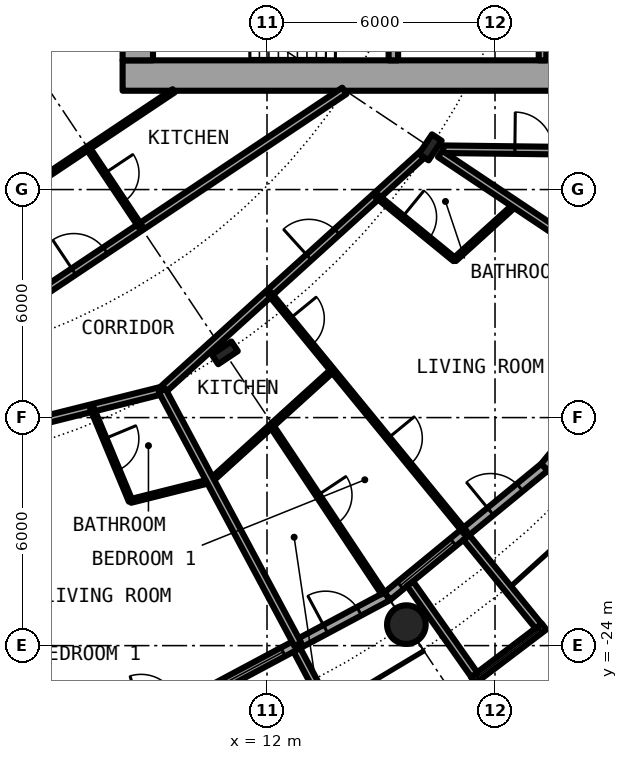
"""IFC4 building model, lengths in metres.
Left out: names, types, materials, properties, quantities, classifications, styles, units other than length and angle.
Written with IfcOpenShell. Run it as: python <this file> out.ifc"""

import sys

from ifc_helpers import new_model, si_unit, direction, frame, frame_2d, origin, origin_2d, place, context, subcontext, project, spatial, rectangle, circle, hollow_circle, i_section, extrude, element, fill, save


model = new_model("IFC4")
c1 = context("Model", 3, precision=1e-05, world=origin(), true_north=direction((0.0, 1.0)))
c2 = subcontext(c1, "Body", "Model", "MODEL_VIEW")
j1 = project(units=[si_unit("LENGTHUNIT", "METRE"), si_unit("PLANEANGLEUNIT", "RADIAN")], contexts=[c1])
p1 = place(None, origin())
s1 = spatial("IfcSite", under=j1, at=p1, CompositionType="ELEMENT")
p2 = place(p1, origin())
s2 = spatial("IfcBuilding", under=s1, at=p2, CompositionType="ELEMENT")
p3 = place(p2, frame((0.0, 0.0, 28.9)))
s3 = spatial("IfcBuildingStorey", under=s2, at=p3, CompositionType="ELEMENT", Elevation=28.9)
p4 = place(p3, frame((15.667, -23.448, 0.0), z_axis=(0.0, 0.0, 1.0), x_axis=(1.0, 0.0, 0.0)))
e1 = element("IfcColumn", 1, at=p4, inside=s3, PredefinedType="COLUMN", context=c2, shape_type="SweptSolid", body=[
    extrude(hollow_circle(Radius=0.508, WallThickness=0.05, at=origin_2d()), origin(), (0.0, 0.0, 1.0), 3.05),
])
for number, where, z_axis, x_axis in (
    (2, (10.889, -16.297, 0.0), (0.0, 0.0, 1.0), (0.556, -0.831, 0.0)),
    (3, (16.297, -10.889, 0.0), (0.0, 0.0, 1.0), (0.831, -0.556, 0.0)),
):
    element("IfcColumn", number, at=place(p3, frame(where, z_axis=z_axis, x_axis=x_axis)), inside=s3, PredefinedType="COLUMN", context=c2, shape_type="SweptSolid", body=[
        extrude(i_section(OverallWidth=0.305, OverallDepth=0.62, WebThickness=0.021, FlangeThickness=0.04, FilletRadius=0.027, at=origin_2d()), origin(), (0.0, 0.0, 1.0), 3.05),
    ])
p5 = place(p3, frame((10.447, -25.222, 0.0), z_axis=(0.0, 0.0, 1.0), x_axis=(0.881915646801, 0.471407246368, 0.0)))
e4 = element("IfcWall", 4, at=p5, inside=s3, PredefinedType="SOLIDWALL", context=c2, shape_type="SweptSolid", body=[
    extrude(rectangle(XDim=5.352, YDim=0.25, at=frame_2d((2.676, 0.0))), origin(), (0.0, 0.0, 1.0), 2.7),
])
p6 = place(p5, frame((0.441, 0.0, 0.3)))
e5 = element("IfcOpeningElement", 5, at=p6, cuts=e4, PredefinedType="OPENING", context=c2, shape_type="SweptSolid", body=[
    extrude(rectangle(XDim=1.8, YDim=2.1, at=frame_2d((0.9, 1.05))), frame((0.0, 0.135, 0.0), z_axis=(0.0, -1.0, 0.0), x_axis=(1.0, 0.0, 0.0)), (0.0, 0.0, 1.0), 0.27),
])
p7 = place(p5, frame((3.51, 0.0, 0.0)))
e6 = element("IfcOpeningElement", 6, at=p7, cuts=e4, PredefinedType="OPENING", context=c2, shape_type="SweptSolid", body=[
    extrude(rectangle(XDim=1.0, YDim=2.2, at=frame_2d((0.5, 1.1))), frame((0.0, 0.135, 0.0), z_axis=(0.0, -1.0, 0.0), x_axis=(1.0, 0.0, 0.0)), (0.0, 0.0, 1.0), 0.27),
])
p8 = place(p3, frame((12.787, -24.113, -0.03), z_axis=(0.0, 0.0, 1.0), x_axis=(0.468365282436, -0.883534924159, 0.0)))
e7 = element("IfcWall", 7, at=p8, inside=s3, PredefinedType="SOLIDWALL", context=c2, shape_type="SweptSolid", body=[
    extrude(rectangle(XDim=3.006, YDim=0.2, at=frame_2d((1.503, 0.0))), origin(), (0.0, 0.0, 1.0), 2.73),
])
p9 = place(p3, frame((15.167, -22.699, 0.0), z_axis=(0.0, 0.0, 1.0), x_axis=(0.773019449054, 0.634382322723, 0.0)))
e8 = element("IfcWall", 8, at=p9, inside=s3, PredefinedType="SOLIDWALL", context=c2, shape_type="SweptSolid", body=[
    extrude(rectangle(XDim=5.352, YDim=0.25, at=frame_2d((2.676, 0.0))), origin(), (0.0, 0.0, 1.0), 2.7),
])
p10 = place(p9, frame((0.441, 0.0, 0.3)))
e9 = element("IfcOpeningElement", 9, at=p10, cuts=e8, PredefinedType="OPENING", context=c2, shape_type="SweptSolid", body=[
    extrude(rectangle(XDim=1.8, YDim=2.1, at=frame_2d((0.9, 1.05))), frame((0.0, 0.135, 0.0), z_axis=(0.0, -1.0, 0.0), x_axis=(1.0, 0.0, 0.0)), (0.0, 0.0, 1.0), 0.27),
])
p11 = place(p9, frame((3.51, 0.0, 0.0)))
e10 = element("IfcOpeningElement", 10, at=p11, cuts=e8, PredefinedType="OPENING", context=c2, shape_type="SweptSolid", body=[
    extrude(rectangle(XDim=1.0, YDim=2.2, at=frame_2d((0.5, 1.1))), frame((0.0, 0.135, 0.0), z_axis=(0.0, -1.0, 0.0), x_axis=(1.0, 0.0, 0.0)), (0.0, 0.0, 1.0), 0.27),
])
p12 = place(p3, frame((17.427, -24.909, -0.03), z_axis=(0.0, 0.0, 1.0), x_axis=(0.796842165306, 0.60418752353, 0.0)))
e11 = element("IfcWall", 11, at=p12, inside=s3, PredefinedType="SOLIDWALL", context=c2, shape_type="SweptSolid", body=[
    extrude(rectangle(XDim=2.337, YDim=0.2, at=frame_2d((1.168, 0.0))), origin(), (0.0, 0.0, 1.0), 2.73),
])
p13 = place(p12, frame((0.128, 0.0, 0.33)))
e12 = element("IfcOpeningElement", 12, at=p13, cuts=e11, PredefinedType="OPENING", context=c2, shape_type="SweptSolid", body=[
    extrude(circle(Radius=1.04, at=frame_2d((1.04, 1.04))), frame((0.0, 0.11, 0.0), z_axis=(0.0, -1.0, 0.0), x_axis=(1.0, 0.0, 0.0)), (0.0, 0.0, 1.0), 0.22),
])
p14 = place(p3, frame((15.765, -22.37, -0.03), z_axis=(0.0, 0.0, 1.0), x_axis=(0.576274612209, -0.817256123454, 0.0)))
e13 = element("IfcWall", 13, at=p14, inside=s3, PredefinedType="SOLIDWALL", context=c2, shape_type="SweptSolid", body=[
    extrude(rectangle(XDim=2.933, YDim=0.2, at=frame_2d((1.466, 0.0))), origin(), (0.0, 0.0, 1.0), 2.73),
])
p15 = place(p3, frame((17.246, -21.155, -0.03), z_axis=(0.0, 0.0, 1.0), x_axis=(0.631741648902, -0.775179004516, 0.0)))
e14 = element("IfcWall", 14, at=p15, inside=s3, PredefinedType="SOLIDWALL", context=c2, shape_type="SweptSolid", body=[
    extrude(rectangle(XDim=3.006, YDim=0.2, at=frame_2d((1.503, 0.0))), origin(), (0.0, 0.0, 1.0), 2.73),
])
p16 = place(p3, frame((19.304, -19.304, 0.0), z_axis=(0.0, 0.0, 1.0), x_axis=(0.634382322723, 0.773019449054, 0.0)))
e15 = element("IfcWall", 15, at=p16, inside=s3, PredefinedType="SOLIDWALL", context=c2, shape_type="SweptSolid", body=[
    extrude(rectangle(XDim=5.352, YDim=0.25, at=frame_2d((2.676, 0.0))), origin(), (0.0, 0.0, 1.0), 2.7),
])
p17 = place(p16, frame((0.441, 0.0, 0.3)))
e16 = element("IfcOpeningElement", 16, at=p17, cuts=e15, PredefinedType="OPENING", context=c2, shape_type="SweptSolid", body=[
    extrude(rectangle(XDim=1.8, YDim=2.1, at=frame_2d((0.9, 1.05))), frame((0.0, 0.135, 0.0), z_axis=(0.0, -1.0, 0.0), x_axis=(1.0, 0.0, 0.0)), (0.0, 0.0, 1.0), 0.27),
])
p18 = place(p16, frame((3.51, 0.0, 0.0)))
e17 = element("IfcOpeningElement", 17, at=p18, cuts=e15, PredefinedType="OPENING", context=c2, shape_type="SweptSolid", body=[
    extrude(rectangle(XDim=1.0, YDim=2.2, at=frame_2d((0.5, 1.1))), frame((0.0, 0.135, 0.0), z_axis=(0.0, -1.0, 0.0), x_axis=(1.0, 0.0, 0.0)), (0.0, 0.0, 1.0), 0.27),
])
p19 = place(p3, frame((19.45, -19.323, -0.03), z_axis=(0.0, 0.0, 1.0), x_axis=(0.709727076896, -0.704476739375, 0.0)))
e18 = element("IfcWall", 18, at=p19, inside=s3, PredefinedType="SOLIDWALL", context=c2, shape_type="SweptSolid", body=[
    extrude(rectangle(XDim=2.883, YDim=0.2, at=frame_2d((1.441, 0.0))), origin(), (0.0, 0.0, 1.0), 2.73),
])
p20 = place(p3, frame((8.2, -9.0, 0.0), z_axis=(0.0, 0.0, 1.0), x_axis=(1.0, 0.0, 0.0)))
e19 = element("IfcWall", 19, at=p20, inside=s3, PredefinedType="SHEAR", context=c2, shape_type="SweptSolid", body=[
    extrude(rectangle(XDim=14.2, YDim=0.8, at=frame_2d((7.1, 0.0))), origin(), (0.0, 0.0, 1.0), 3.05),
])
p21 = place(p20, frame((11.675, 0.0, 0.0)))
e20 = element("IfcOpeningElement", 20, at=p21, cuts=e19, PredefinedType="OPENING", context=c2, shape_type="SweptSolid", body=[
    extrude(rectangle(XDim=1.2, YDim=2.3, at=frame_2d((0.6, 1.15))), frame((0.0, 0.41, 0.0), z_axis=(0.0, -1.0, 0.0), x_axis=(1.0, 0.0, 0.0)), (0.0, 0.0, 1.0), 0.82),
])
p22 = place(p3, frame((8.6, -8.6, 0.0), z_axis=(0.0, 0.0, 1.0), x_axis=(0.0, 1.0, 0.0)))
e21 = element("IfcWall", 21, at=p22, inside=s3, PredefinedType="SHEAR", context=c2, shape_type="SweptSolid", body=[
    extrude(rectangle(XDim=17.2, YDim=0.8, at=frame_2d((8.6, 0.0))), origin(), (0.0, 0.0, 1.0), 3.05),
])
p23 = place(p22, frame((7.4, 0.0, 0.1)))
e22 = element("IfcOpeningElement", 22, at=p23, cuts=e21, PredefinedType="OPENING", context=c2, shape_type="SweptSolid", body=[
    extrude(rectangle(XDim=2.4, YDim=2.2, at=frame_2d((1.2, 1.1))), frame((0.0, 0.41, 0.0), z_axis=(0.0, -1.0, 0.0), x_axis=(1.0, 0.0, 0.0)), (0.0, 0.0, 1.0), 0.82),
])
p24 = place(p3, frame((15.325, -8.6, 0.0), z_axis=(0.0, 0.0, 1.0), x_axis=(0.0, 1.0, 0.0)))
e23 = element("IfcWall", 23, at=p24, inside=s3, PredefinedType="SHEAR", context=c2, shape_type="SweptSolid", body=[
    extrude(rectangle(XDim=3.95, YDim=0.25, at=frame_2d((1.975, 0.0))), origin(), (0.0, 0.0, 1.0), 3.05),
])
p25 = place(p24, frame((2.025, 0.0, 0.0)))
e24 = element("IfcOpeningElement", 24, at=p25, cuts=e23, PredefinedType="OPENING", context=c2, shape_type="SweptSolid", body=[
    extrude(rectangle(XDim=1.2, YDim=2.3, at=frame_2d((0.6, 1.15))), frame((0.0, 0.135, 0.0), z_axis=(0.0, -1.0, 0.0), x_axis=(1.0, 0.0, 0.0)), (0.0, 0.0, 1.0), 0.27),
])
p26 = place(p3, frame((19.25, -8.6, 0.0), z_axis=(0.0, 0.0, 1.0), x_axis=(0.0, 1.0, 0.0)))
e25 = element("IfcWall", 25, at=p26, inside=s3, PredefinedType="SOLIDWALL", context=c2, shape_type="SweptSolid", body=[
    extrude(rectangle(XDim=7.025, YDim=0.2, at=frame_2d((3.513, 0.0))), origin(), (0.0, 0.0, 1.0), 2.7),
])
p27 = place(p26, frame((2.35, 0.0, 0.0)))
e26 = element("IfcOpeningElement", 26, at=p27, cuts=e25, PredefinedType="OPENING", context=c2, shape_type="SweptSolid", body=[
    extrude(rectangle(XDim=1.1, YDim=2.3, at=frame_2d((0.55, 1.15))), frame((0.0, 0.11, 0.0), z_axis=(0.0, -1.0, 0.0), x_axis=(1.0, 0.0, 0.0)), (0.0, 0.0, 1.0), 0.22),
])
p28 = place(p3, frame((8.414, -20.193, 0.0), z_axis=(0.0, 0.0, 1.0), x_axis=(0.970076188308, 0.242800718444, 0.0)))
e27 = element("IfcWall", 27, at=p28, inside=s3, PredefinedType="PARTITIONING", context=c2, shape_type="SweptSolid", body=[
    extrude(rectangle(XDim=2.167, YDim=0.1, at=frame_2d((1.083, 0.0))), origin(), (0.0, 0.0, 1.0), 2.7),
])
p29 = place(p3, frame((10.513, -19.668, 0.0), z_axis=(0.0, 0.0, 1.0), x_axis=(0.74092137325, 0.671591779775, 0.0)))
e28 = element("IfcWall", 28, at=p29, inside=s3, PredefinedType="PARTITIONING", context=c2, shape_type="SweptSolid", body=[
    extrude(rectangle(XDim=4.342, YDim=0.1, at=frame_2d((2.171, 0.0))), origin(), (0.0, 0.0, 1.0), 2.7),
])
p30 = place(p3, frame((16.936, -13.845, 0.0), z_axis=(0.0, 0.0, 1.0), x_axis=(0.740836325503, 0.671685595212, 0.0)))
e29 = element("IfcWall", 29, at=p30, inside=s3, PredefinedType="PARTITIONING", context=c2, shape_type="SweptSolid", body=[
    extrude(rectangle(XDim=2.168, YDim=0.1, at=frame_2d((1.084, 0.0))), origin(), (0.0, 0.0, 1.0), 2.7),
])
p31 = place(p3, frame((-0.001, -19.601, 0.0), z_axis=(0.0, 0.0, 1.0), x_axis=(0.970014215304, 0.243048188859, 0.0)))
e30 = element("IfcWall", 30, at=p31, inside=s3, PredefinedType="PARTITIONING", context=c2, shape_type="SweptSolid", body=[
    extrude(rectangle(XDim=9.526, YDim=0.2, at=frame_2d((4.763, 0.0))), origin(), (0.0, 0.0, 1.0), 2.38),
])
p32 = place(p31, frame((5.221, 0.0, 0.0)))
e31 = element("IfcOpeningElement", 31, at=p32, cuts=e30, PredefinedType="OPENING", context=c2, shape_type="SweptSolid", body=[
    extrude(rectangle(XDim=1.0, YDim=2.3, at=frame_2d((0.5, 1.15))), frame((0.0, 0.11, 0.0), z_axis=(0.0, -1.0, 0.0), x_axis=(1.0, 0.0, 0.0)), (0.0, 0.0, 1.0), 0.22),
])
p33 = place(p3, frame((9.239, -17.286, 0.0), z_axis=(0.0, 0.0, 1.0), x_axis=(0.74089212117, 0.671624050186, 0.0)))
e32 = element("IfcWall", 32, at=p33, inside=s3, PredefinedType="PARTITIONING", context=c2, shape_type="SweptSolid", body=[
    extrude(rectangle(XDim=9.368, YDim=0.2, at=frame_2d((4.684, 0.0))), origin(), (0.0, 0.0, 1.0), 2.38),
])
p34 = place(p33, frame((5.215, 0.0, 0.0)))
e33 = element("IfcOpeningElement", 33, at=p34, cuts=e32, PredefinedType="OPENING", context=c2, shape_type="SweptSolid", body=[
    extrude(rectangle(XDim=1.0, YDim=2.3, at=frame_2d((0.5, 1.15))), frame((0.0, 0.11, 0.0), z_axis=(0.0, -1.0, 0.0), x_axis=(1.0, 0.0, 0.0)), (0.0, 0.0, 1.0), 0.22),
])
p35 = place(p3, frame((3.297, -16.575, 0.0), z_axis=(0.0, 0.0, 1.0), x_axis=(0.831561346449, 0.555432918625, 0.0)))
e34 = element("IfcWall", 34, at=p35, inside=s3, PredefinedType="PARTITIONING", context=c2, shape_type="SweptSolid", body=[
    extrude(rectangle(XDim=12.914, YDim=0.2, at=frame_2d((6.457, 0.0))), origin(), (0.0, 0.0, 1.0), 2.7),
])
p36 = place(p35, frame((4.352, 0.0, 0.0)))
e35 = element("IfcOpeningElement", 35, at=p36, cuts=e34, PredefinedType="OPENING", context=c2, shape_type="SweptSolid", body=[
    extrude(rectangle(XDim=1.0, YDim=2.3, at=frame_2d((0.5, 1.15))), frame((0.0, 0.11, 0.0), z_axis=(0.0, -1.0, 0.0), x_axis=(1.0, 0.0, 0.0)), (0.0, 0.0, 1.0), 0.22),
])
p37 = place(p3, frame((6.158, -11.664, 0.0), z_axis=(0.0, 0.0, 1.0), x_axis=(0.831459707426, 0.555585056429, 0.0)))
e36 = element("IfcWall", 36, at=p37, inside=s3, PredefinedType="PARTITIONING", context=c2, shape_type="SweptSolid", body=[
    extrude(rectangle(XDim=4.073, YDim=0.1, at=frame_2d((2.037, 0.0))), origin(), (0.0, 0.0, 1.0), 2.7),
])
p38 = place(p3, frame((16.636, -10.939, 0.0), z_axis=(0.0, 0.0, 1.0), x_axis=(0.999926652916, -0.012111514691, 0.0)))
e37 = element("IfcWall", 37, at=p38, inside=s3, PredefinedType="PARTITIONING", context=c2, shape_type="SweptSolid", body=[
    extrude(rectangle(XDim=5.04, YDim=0.2, at=frame_2d((2.52, 0.0))), origin(), (0.0, 0.0, 1.0), 2.7),
])
p39 = place(p38, frame((1.886, 0.0, 0.0)))
e38 = element("IfcOpeningElement", 38, at=p39, cuts=e37, PredefinedType="OPENING", context=c2, shape_type="SweptSolid", body=[
    extrude(rectangle(XDim=1.0, YDim=2.3, at=frame_2d((0.5, 1.15))), frame((0.0, 0.11, 0.0), z_axis=(0.0, -1.0, 0.0), x_axis=(1.0, 0.0, 0.0)), (0.0, 0.0, 1.0), 0.22),
])
p40 = place(p3, frame((7.289, -10.908, 0.0), z_axis=(0.0, 0.0, 1.0), x_axis=(0.555355163998, -0.831613276602, 0.0)))
e39 = element("IfcWall", 39, at=p40, inside=s3, PredefinedType="PARTITIONING", context=c2, shape_type="SweptSolid", body=[
    extrude(rectangle(XDim=2.494, YDim=0.1, at=frame_2d((1.247, 0.0))), origin(), (0.0, 0.0, 1.0), 2.7),
])
p41 = place(p40, frame((0.797, 0.0, 0.0)))
e40 = element("IfcOpeningElement", 40, at=p41, cuts=e39, PredefinedType="OPENING", context=c2, shape_type="SweptSolid", body=[
    extrude(rectangle(XDim=0.9, YDim=2.3, at=frame_2d((0.45, 1.15))), frame((0.0, 0.06, 0.0), z_axis=(0.0, -1.0, 0.0), x_axis=(1.0, 0.0, 0.0)), (0.0, 0.0, 1.0), 0.12),
])
p42 = place(p3, frame((7.392, -17.749, 0.0), z_axis=(0.0, 0.0, 1.0), x_axis=(0.384438589316, -0.923150567917, 0.0)))
e41 = element("IfcWall", 41, at=p42, inside=s3, PredefinedType="PARTITIONING", context=c2, shape_type="SweptSolid", body=[
    extrude(rectangle(XDim=2.647, YDim=0.1, at=frame_2d((1.324, 0.0))), origin(), (0.0, 0.0, 1.0), 2.7),
])
p43 = place(p42, frame((0.874, 0.0, 0.0)))
e42 = element("IfcOpeningElement", 42, at=p43, cuts=e41, PredefinedType="OPENING", context=c2, shape_type="SweptSolid", body=[
    extrude(rectangle(XDim=0.9, YDim=2.3, at=frame_2d((0.45, 1.15))), frame((0.0, 0.06, 0.0), z_axis=(0.0, -1.0, 0.0), x_axis=(1.0, 0.0, 0.0)), (0.0, 0.0, 1.0), 0.12),
])
p44 = place(p3, frame((9.239, -17.286, 0.0), z_axis=(0.0, 0.0, 1.0), x_axis=(0.471439510802, -0.881898399848, 0.0)))
e43 = element("IfcWall", 43, at=p44, inside=s3, PredefinedType="PARTITIONING", context=c2, shape_type="SweptSolid", body=[
    extrude(rectangle(XDim=7.575, YDim=0.2, at=frame_2d((3.787, 0.0))), origin(), (0.0, 0.0, 1.0), 2.7),
])
p45 = place(p3, frame((12.062, -14.727, 0.0), z_axis=(0.0, 0.0, 1.0), x_axis=(0.633664062855, -0.773608334654, 0.0)))
e44 = element("IfcWall", 44, at=p45, inside=s3, PredefinedType="PARTITIONING", context=c2, shape_type="SweptSolid", body=[
    extrude(rectangle(XDim=8.138, YDim=0.1, at=frame_2d((4.069, 0.0))), origin(), (0.0, 0.0, 1.0), 2.7),
])
p46 = place(p45, frame((0.861, 0.0, 0.0)))
e45 = element("IfcOpeningElement", 45, at=p46, cuts=e44, PredefinedType="OPENING", context=c2, shape_type="SweptSolid", body=[
    extrude(rectangle(XDim=0.9, YDim=2.3, at=frame_2d((0.45, 1.15))), frame((0.0, 0.06, 0.0), z_axis=(0.0, -1.0, 0.0), x_axis=(1.0, 0.0, 0.0)), (0.0, 0.0, 1.0), 0.12),
])
p47 = place(p45, frame((4.931, 0.0, 0.0)))
e46 = element("IfcOpeningElement", 46, at=p47, cuts=e44, PredefinedType="OPENING", context=c2, shape_type="SweptSolid", body=[
    extrude(rectangle(XDim=0.9, YDim=2.3, at=frame_2d((0.45, 1.15))), frame((0.0, 0.06, 0.0), z_axis=(0.0, -1.0, 0.0), x_axis=(1.0, 0.0, 0.0)), (0.0, 0.0, 1.0), 0.12),
])
p48 = place(p3, frame((12.118, -18.211, 0.0), z_axis=(0.0, 0.0, 1.0), x_axis=(0.553913391217, -0.832574294, 0.0)))
e47 = element("IfcWall", 47, at=p48, inside=s3, PredefinedType="PARTITIONING", context=c2, shape_type="SweptSolid", body=[
    extrude(rectangle(XDim=5.301, YDim=0.1, at=frame_2d((2.65, 0.0))), origin(), (0.0, 0.0, 1.0), 2.7),
])
p49 = place(p48, frame((2.2, 0.0, 0.0)))
e48 = element("IfcOpeningElement", 48, at=p49, cuts=e47, PredefinedType="OPENING", context=c2, shape_type="SweptSolid", body=[
    extrude(rectangle(XDim=0.9, YDim=2.3, at=frame_2d((0.45, 1.15))), frame((0.0, 0.06, 0.0), z_axis=(0.0, -1.0, 0.0), x_axis=(1.0, 0.0, 0.0)), (0.0, 0.0, 1.0), 0.12),
])
p50 = place(p3, frame((14.885, -12.168, 0.0), z_axis=(0.0, 0.0, 1.0), x_axis=(0.774162545943, -0.632986850147, 0.0)))
e49 = element("IfcWall", 49, at=p50, inside=s3, PredefinedType="PARTITIONING", context=c2, shape_type="SweptSolid", body=[
    extrude(rectangle(XDim=2.649, YDim=0.1, at=frame_2d((1.325, 0.0))), origin(), (0.0, 0.0, 1.0), 2.7),
])
p51 = place(p50, frame((0.875, 0.0, 0.0)))
e50 = element("IfcOpeningElement", 50, at=p51, cuts=e49, PredefinedType="OPENING", context=c2, shape_type="SweptSolid", body=[
    extrude(rectangle(XDim=0.9, YDim=2.3, at=frame_2d((0.45, 1.15))), frame((0.0, 0.06, 0.0), z_axis=(0.0, -1.0, 0.0), x_axis=(1.0, 0.0, 0.0)), (0.0, 0.0, 1.0), 0.12),
])
p52 = place(p3, frame((16.555, -11.061, 0.0), z_axis=(0.0, 0.0, 1.0), x_axis=(0.831507055747, -0.555514190857, 0.0)))
e51 = element("IfcWall", 51, at=p52, inside=s3, PredefinedType="PARTITIONING", context=c2, shape_type="SweptSolid", body=[
    extrude(rectangle(XDim=7.265, YDim=0.2, at=frame_2d((3.633, 0.0))), origin(), (0.0, 0.0, 1.0), 2.7),
])
p53 = place(p6, origin())
e52 = element("IfcWindow", 52, at=p53, inside=s3, PartitioningType="SINGLE_PANEL", PredefinedType="WINDOW", context=c2, shape_type="SweptSolid", body=[
    extrude(rectangle(XDim=1.8, YDim=2.1, at=frame_2d((0.9, 1.05))), frame((0.0, 0.03, 0.0), z_axis=(0.0, -1.0, 0.0), x_axis=(1.0, 0.0, 0.0)), (0.0, 0.0, 1.0), 0.06),
])
fill(e5, e52)
p54 = place(p7, origin())
e53 = element("IfcDoor", 53, at=p54, inside=s3, OperationType="SINGLE_SWING_LEFT", PredefinedType="DOOR", context=c2, shape_type="SweptSolid", body=[
    extrude(rectangle(XDim=1.0, YDim=2.2, at=frame_2d((0.5, 1.1))), frame((0.0, 0.025, 0.0), z_axis=(0.0, -1.0, 0.0), x_axis=(1.0, 0.0, 0.0)), (0.0, 0.0, 1.0), 0.05),
])
fill(e6, e53)
p55 = place(p10, origin())
e54 = element("IfcWindow", 54, at=p55, inside=s3, PartitioningType="SINGLE_PANEL", PredefinedType="WINDOW", context=c2, shape_type="SweptSolid", body=[
    extrude(rectangle(XDim=1.8, YDim=2.1, at=frame_2d((0.9, 1.05))), frame((0.0, 0.03, 0.0), z_axis=(0.0, -1.0, 0.0), x_axis=(1.0, 0.0, 0.0)), (0.0, 0.0, 1.0), 0.06),
])
fill(e9, e54)
p56 = place(p13, origin())
e55 = element("IfcWindow", 55, at=p56, inside=s3, PartitioningType="SINGLE_PANEL", PredefinedType="WINDOW", context=c2, shape_type="SweptSolid", body=[
    extrude(circle(Radius=1.04, at=frame_2d((1.04, 1.04))), frame((0.0, 0.03, 0.0), z_axis=(0.0, -1.0, 0.0), x_axis=(1.0, 0.0, 0.0)), (0.0, 0.0, 1.0), 0.06),
])
fill(e12, e55)
p57 = place(p11, origin())
e56 = element("IfcDoor", 56, at=p57, inside=s3, OperationType="SINGLE_SWING_LEFT", PredefinedType="DOOR", context=c2, shape_type="SweptSolid", body=[
    extrude(rectangle(XDim=1.0, YDim=2.2, at=frame_2d((0.5, 1.1))), frame((0.0, 0.025, 0.0), z_axis=(0.0, -1.0, 0.0), x_axis=(1.0, 0.0, 0.0)), (0.0, 0.0, 1.0), 0.05),
])
fill(e10, e56)
p58 = place(p43, origin())
e57 = element("IfcDoor", 57, at=p58, inside=s3, OperationType="SINGLE_SWING_RIGHT", PredefinedType="DOOR", context=c2, shape_type="SweptSolid", body=[
    extrude(rectangle(XDim=0.9, YDim=2.3, at=frame_2d((0.45, 1.15))), frame((0.0, 0.025, 0.0), z_axis=(0.0, -1.0, 0.0), x_axis=(1.0, 0.0, 0.0)), (0.0, 0.0, 1.0), 0.05),
])
fill(e42, e57)
p59 = place(p34, origin())
e58 = element("IfcDoor", 58, at=p59, inside=s3, OperationType="SINGLE_SWING_RIGHT", PredefinedType="DOOR", context=c2, shape_type="SweptSolid", body=[
    extrude(rectangle(XDim=1.0, YDim=2.3, at=frame_2d((0.5, 1.15))), frame((0.0, 0.025, 0.0), z_axis=(0.0, -1.0, 0.0), x_axis=(1.0, 0.0, 0.0)), (0.0, 0.0, 1.0), 0.05),
])
fill(e33, e58)
p60 = place(p51, origin())
e59 = element("IfcDoor", 59, at=p60, inside=s3, OperationType="SINGLE_SWING_RIGHT", PredefinedType="DOOR", context=c2, shape_type="SweptSolid", body=[
    extrude(rectangle(XDim=0.9, YDim=2.3, at=frame_2d((0.45, 1.15))), frame((0.0, 0.025, 0.0), z_axis=(0.0, -1.0, 0.0), x_axis=(1.0, 0.0, 0.0)), (0.0, 0.0, 1.0), 0.05),
])
fill(e50, e59)
p61 = place(p46, origin())
e60 = element("IfcDoor", 60, at=p61, inside=s3, OperationType="SINGLE_SWING_LEFT", PredefinedType="DOOR", context=c2, shape_type="SweptSolid", body=[
    extrude(rectangle(XDim=0.9, YDim=2.3, at=frame_2d((0.45, 1.15))), frame((0.0, 0.025, 0.0), z_axis=(0.0, -1.0, 0.0), x_axis=(1.0, 0.0, 0.0)), (0.0, 0.0, 1.0), 0.05),
])
fill(e45, e60)
p62 = place(p47, origin())
e61 = element("IfcDoor", 61, at=p62, inside=s3, OperationType="SINGLE_SWING_RIGHT", PredefinedType="DOOR", context=c2, shape_type="SweptSolid", body=[
    extrude(rectangle(XDim=0.9, YDim=2.3, at=frame_2d((0.45, 1.15))), frame((0.0, 0.025, 0.0), z_axis=(0.0, -1.0, 0.0), x_axis=(1.0, 0.0, 0.0)), (0.0, 0.0, 1.0), 0.05),
])
fill(e46, e61)
p63 = place(p49, origin())
e62 = element("IfcDoor", 62, at=p63, inside=s3, OperationType="SINGLE_SWING_RIGHT", PredefinedType="DOOR", context=c2, shape_type="SweptSolid", body=[
    extrude(rectangle(XDim=0.9, YDim=2.3, at=frame_2d((0.45, 1.15))), frame((0.0, 0.025, 0.0), z_axis=(0.0, -1.0, 0.0), x_axis=(1.0, 0.0, 0.0)), (0.0, 0.0, 1.0), 0.05),
])
fill(e48, e62)
p64 = place(p36, origin())
e63 = element("IfcDoor", 63, at=p64, inside=s3, OperationType="SINGLE_SWING_LEFT", PredefinedType="DOOR", context=c2, shape_type="SweptSolid", body=[
    extrude(rectangle(XDim=1.0, YDim=2.3, at=frame_2d((0.5, 1.15))), frame((0.0, 0.025, 0.0), z_axis=(0.0, -1.0, 0.0), x_axis=(1.0, 0.0, 0.0)), (0.0, 0.0, 1.0), 0.05),
])
fill(e35, e63)
p65 = place(p41, origin())
e64 = element("IfcDoor", 64, at=p65, inside=s3, OperationType="SINGLE_SWING_RIGHT", PredefinedType="DOOR", context=c2, shape_type="SweptSolid", body=[
    extrude(rectangle(XDim=0.9, YDim=2.3, at=frame_2d((0.45, 1.15))), frame((0.0, 0.025, 0.0), z_axis=(0.0, -1.0, 0.0), x_axis=(1.0, 0.0, 0.0)), (0.0, 0.0, 1.0), 0.05),
])
fill(e40, e64)
p66 = place(p39, origin())
e65 = element("IfcDoor", 65, at=p66, inside=s3, OperationType="SINGLE_SWING_LEFT", PredefinedType="DOOR", context=c2, shape_type="SweptSolid", body=[
    extrude(rectangle(XDim=1.0, YDim=2.3, at=frame_2d((0.5, 1.15))), frame((0.0, 0.025, 0.0), z_axis=(0.0, -1.0, 0.0), x_axis=(1.0, 0.0, 0.0)), (0.0, 0.0, 1.0), 0.05),
])
fill(e38, e65)
save(model, sys.argv[1])
